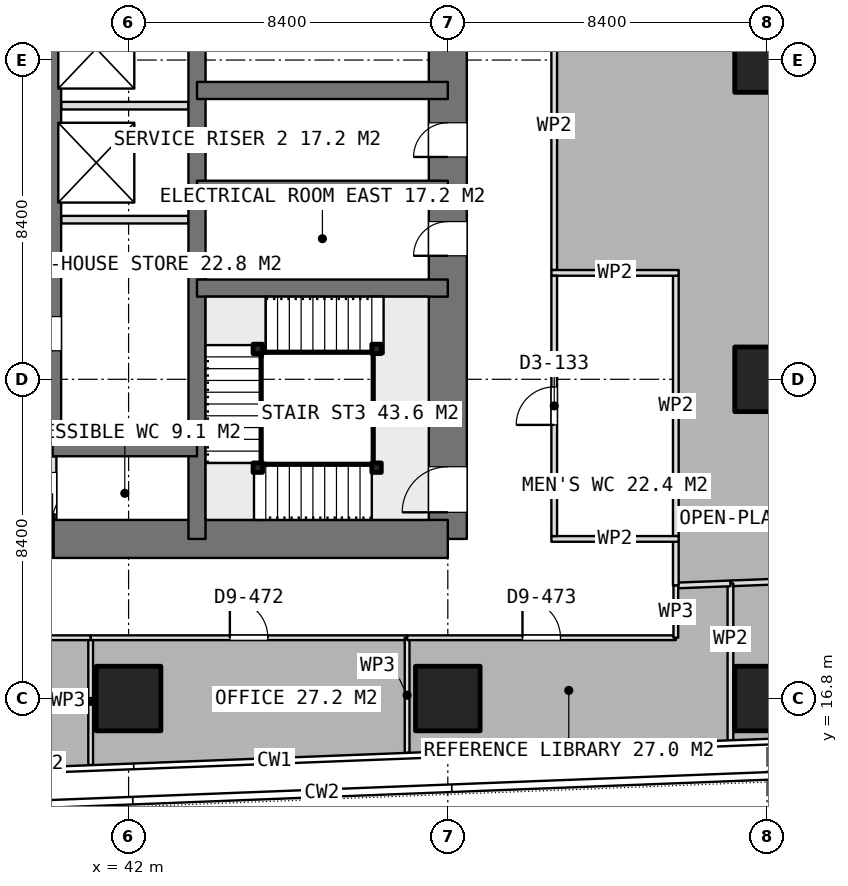
"""IFC4 building model, lengths in metres.
Left out: names, types, materials, properties, quantities, classifications, styles, units other than length and angle.
Written with IfcOpenShell. Run it as: python <this file> out.ifc"""

import sys

from ifc_helpers import new_model, si_unit, direction, frame, frame_2d, origin, origin_2d, place, context, subcontext, project, spatial, rectangle, extrude, element, fill, save


model = new_model("IFC4")
c1 = context("Model", 3, precision=1e-05, world=origin(), true_north=direction((0.0, 1.0)))
c2 = subcontext(c1, "Body", "Model", "MODEL_VIEW")
j1 = project(units=[si_unit("LENGTHUNIT", "METRE"), si_unit("PLANEANGLEUNIT", "RADIAN")], contexts=[c1])
p1 = place(None, origin())
s1 = spatial("IfcSite", under=j1, at=p1, CompositionType="ELEMENT")
p2 = place(p1, origin())
s2 = spatial("IfcBuilding", under=s1, at=p2, CompositionType="ELEMENT")
p3 = place(p2, frame((0.0, 0.0, 125.3)))
s3 = spatial("IfcBuildingStorey", under=s2, at=p3, CompositionType="ELEMENT", Elevation=125.3)
p4 = place(p3, frame((40.0, 21.0, 0.0), z_axis=(0.0, 0.0, 1.0), x_axis=(1.0, 0.0, 0.0)))
e1 = element("IfcWall", 1, at=p4, inside=s3, PredefinedType="SHEAR", context=c2, shape_type="SweptSolid", body=[
    extrude(rectangle(XDim=10.4, YDim=1.0, at=frame_2d((5.2, 0.0))), origin(), (0.0, 0.0, 1.0), 3.75),
])
p5 = place(p3, frame((50.4, 21.0, 0.0), z_axis=(0.0, 0.0, 1.0), x_axis=(0.0, 1.0, 0.0)))
e2 = element("IfcWall", 2, at=p5, inside=s3, PredefinedType="SHEAR", context=c2, shape_type="SweptSolid", body=[
    extrude(rectangle(XDim=25.2, YDim=1.0, at=frame_2d((12.6, 0.0))), origin(), (0.0, 0.0, 1.0), 3.75),
])
p6 = place(p5, frame((16.2, 0.0, 0.0)))
e3 = element("IfcOpeningElement", 3, at=p6, cuts=e2, PredefinedType="OPENING", context=c2, shape_type="SweptSolid", body=[
    extrude(rectangle(XDim=1.2, YDim=2.1, at=frame_2d((0.6, 1.05))), frame((0.0, 0.51, 0.0), z_axis=(0.0, -1.0, 0.0), x_axis=(1.0, 0.0, 0.0)), (0.0, 0.0, 1.0), 1.02),
])
p7 = place(p5, frame((10.05, 0.0, 0.0)))
e4 = element("IfcOpeningElement", 4, at=p7, cuts=e2, PredefinedType="OPENING", context=c2, shape_type="SweptSolid", body=[
    extrude(rectangle(XDim=0.9, YDim=2.1, at=frame_2d((0.45, 1.05))), frame((0.0, 0.51, 0.0), z_axis=(0.0, -1.0, 0.0), x_axis=(1.0, 0.0, 0.0)), (0.0, 0.0, 1.0), 1.02),
])
p8 = place(p5, frame((7.45, 0.0, 0.0)))
e5 = element("IfcOpeningElement", 5, at=p8, cuts=e2, PredefinedType="OPENING", context=c2, shape_type="SweptSolid", body=[
    extrude(rectangle(XDim=0.9, YDim=2.1, at=frame_2d((0.45, 1.05))), frame((0.0, 0.51, 0.0), z_axis=(0.0, -1.0, 0.0), x_axis=(1.0, 0.0, 0.0)), (0.0, 0.0, 1.0), 1.02),
])
p9 = place(p5, frame((0.7, 0.0, 0.0)))
e6 = element("IfcOpeningElement", 6, at=p9, cuts=e2, PredefinedType="OPENING", context=c2, shape_type="SweptSolid", body=[
    extrude(rectangle(XDim=1.2, YDim=2.1, at=frame_2d((0.6, 1.05))), frame((0.0, 0.51, 0.0), z_axis=(0.0, -1.0, 0.0), x_axis=(1.0, 0.0, 0.0)), (0.0, 0.0, 1.0), 1.02),
])
p10 = place(p3, frame((43.8, 21.0, 0.0), z_axis=(0.0, 0.0, 1.0), x_axis=(0.0, 1.0, 0.0)))
e7 = element("IfcWall", 7, at=p10, inside=s3, PredefinedType="SHEAR", context=c2, shape_type="SweptSolid", body=[
    extrude(rectangle(XDim=25.2, YDim=0.45, at=frame_2d((12.6, 0.0))), origin(), (0.0, 0.0, 1.0), 3.75),
])
p11 = place(p3, frame((40.0, 23.4, 0.0), z_axis=(0.0, 0.0, 1.0), x_axis=(0.0, 1.0, 0.0)))
e8 = element("IfcWall", 8, at=p11, inside=s3, PredefinedType="SHEAR", context=c2, shape_type="SweptSolid", body=[
    extrude(rectangle(XDim=18.0, YDim=0.45, at=frame_2d((9.0, 0.0))), origin(), (0.0, 0.0, 1.0), 3.75),
])
p12 = place(p11, frame((2.55, 0.0, 0.0)))
e9 = element("IfcOpeningElement", 9, at=p12, cuts=e8, PredefinedType="OPENING", context=c2, shape_type="SweptSolid", body=[
    extrude(rectangle(XDim=0.9, YDim=2.1, at=frame_2d((0.45, 1.05))), frame((0.0, 0.235, 0.0), z_axis=(0.0, -1.0, 0.0), x_axis=(1.0, 0.0, 0.0)), (0.0, 0.0, 1.0), 0.47),
])
p13 = place(p3, frame((40.0, 23.4, 0.0), z_axis=(0.0, 0.0, 1.0), x_axis=(1.0, 0.0, 0.0)))
e10 = element("IfcWall", 10, at=p13, inside=s3, PredefinedType="SHEAR", context=c2, shape_type="SweptSolid", body=[
    extrude(rectangle(XDim=3.8, YDim=0.45, at=frame_2d((1.9, 0.0))), origin(), (0.0, 0.0, 1.0), 3.75),
])
for number, where, z_axis, x_axis in (
    (11, (43.8, 27.6, 0.0), (0.0, 0.0, 1.0), (1.0, 0.0, 0.0)),
    (12, (43.8, 30.2, 0.0), (0.0, 0.0, 1.0), (1.0, 0.0, 0.0)),
    (13, (43.8, 32.8, 0.0), (0.0, 0.0, 1.0), (1.0, 0.0, 0.0)),
):
    element("IfcWall", number, at=place(p3, frame(where, z_axis=z_axis, x_axis=x_axis)), inside=s3, PredefinedType="SHEAR", context=c2, shape_type="SweptSolid", body=[
        extrude(rectangle(XDim=6.6, YDim=0.45, at=frame_2d((3.3, 0.0))), origin(), (0.0, 0.0, 1.0), 3.75),
    ])
for number, where, z_axis, x_axis in (
    (14, (42.0, 16.8, 0.0), (0.0, 0.0, 1.0), (1.0, 0.0, 0.0)),
    (15, (50.4, 16.8, 0.0), (0.0, 0.0, 1.0), (1.0, 0.0, 0.0)),
    (16, (58.8, 16.8, 0.0), (0.0, 0.0, 1.0), (1.0, 0.0, 0.0)),
    (17, (58.8, 25.2, 0.0), (0.0, 0.0, 1.0), (1.0, 0.0, 0.0)),
    (18, (58.8, 33.6, 0.0), (0.0, 0.0, 1.0), (1.0, 0.0, 0.0)),
):
    element("IfcColumn", number, at=place(p3, frame(where, z_axis=z_axis, x_axis=x_axis)), inside=s3, PredefinedType="COLUMN", context=c2, shape_type="SweptSolid", body=[
        extrude(rectangle(XDim=1.7, YDim=1.7, at=origin_2d()), origin(), (0.0, 0.0, 1.0), 3.75),
    ])
for number, where, z_axis, x_axis in (
    (19, (40.225, 29.4, 0.0), (0.0, 0.0, 1.0), (1.0, 0.0, 0.0)),
    (20, (40.225, 32.4, 0.0), (0.0, 0.0, 1.0), (1.0, 0.0, 0.0)),
):
    element("IfcWall", number, at=place(p3, frame(where, z_axis=z_axis, x_axis=x_axis)), inside=s3, PredefinedType="PARTITIONING", context=c2, shape_type="SweptSolid", body=[
        extrude(rectangle(XDim=3.35, YDim=0.2, at=frame_2d((1.675, 0.0))), origin(), (0.0, 0.0, 1.0), 3.5),
    ])
p14 = place(p3, frame((40.0, 21.5, 0.0), z_axis=(0.0, 0.0, 1.0), x_axis=(0.0, 1.0, 0.0)))
e21 = element("IfcWall", 21, at=p14, inside=s3, PredefinedType="PARTITIONING", context=c2, shape_type="SweptSolid", body=[
    extrude(rectangle(XDim=1.675, YDim=0.2, at=frame_2d((0.837, 0.0))), origin(), (0.0, 0.0, 1.0), 3.5),
])
p15 = place(p14, frame((0.15, 0.0, 0.0)))
e22 = element("IfcOpeningElement", 22, at=p15, cuts=e21, PredefinedType="OPENING", context=c2, shape_type="SweptSolid", body=[
    extrude(rectangle(XDim=1.1, YDim=2.1, at=frame_2d((0.55, 1.05))), frame((0.0, 0.11, 0.0), z_axis=(0.0, -1.0, 0.0), x_axis=(1.0, 0.0, 0.0)), (0.0, 0.0, 1.0), 0.22),
])
for number, where, z_axis, x_axis in (
    (23, (53.125, 21.0, 0.0), (0.0, 0.0, 1.0), (1.0, 0.0, 0.0)),
    (24, (53.125, 28.0, 0.0), (0.0, 0.0, 1.0), (1.0, 0.0, 0.0)),
):
    element("IfcWall", number, at=place(p3, frame(where, z_axis=z_axis, x_axis=x_axis)), inside=s3, PredefinedType="PARTITIONING", context=c2, shape_type="SweptSolid", body=[
        extrude(rectangle(XDim=3.35, YDim=0.15, at=frame_2d((1.675, 0.0))), origin(), (0.0, 0.0, 1.0), 3.5),
    ])
p16 = place(p3, frame((53.2, 21.075, 0.0), z_axis=(0.0, 0.0, 1.0), x_axis=(0.0, 1.0, 0.0)))
e25 = element("IfcWall", 25, at=p16, inside=s3, PredefinedType="PARTITIONING", context=c2, shape_type="SweptSolid", body=[
    extrude(rectangle(XDim=6.85, YDim=0.15, at=frame_2d((3.425, 0.0))), origin(), (0.0, 0.0, 1.0), 3.5),
])
p17 = place(p16, frame((2.925, 0.0, 0.0)))
e26 = element("IfcOpeningElement", 26, at=p17, cuts=e25, PredefinedType="OPENING", context=c2, shape_type="SweptSolid", body=[
    extrude(rectangle(XDim=1.0, YDim=2.1, at=frame_2d((0.5, 1.05))), frame((0.0, 0.085, 0.0), z_axis=(0.0, -1.0, 0.0), x_axis=(1.0, 0.0, 0.0)), (0.0, 0.0, 1.0), 0.17),
])
p18 = place(p3, frame((56.4, 21.075, 0.0), z_axis=(0.0, 0.0, 1.0), x_axis=(0.0, 1.0, 0.0)))
e27 = element("IfcWall", 27, at=p18, inside=s3, PredefinedType="PARTITIONING", context=c2, shape_type="SweptSolid", body=[
    extrude(rectangle(XDim=6.85, YDim=0.15, at=frame_2d((3.425, 0.0))), origin(), (0.0, 0.0, 1.0), 3.5),
])
p19 = place(p3, frame((53.2, 28.075, 0.0), z_axis=(0.0, 0.0, 1.0), x_axis=(0.0, 1.0, 0.0)))
e28 = element("IfcWall", 28, at=p19, inside=s3, PredefinedType="PARTITIONING", context=c2, shape_type="SweptSolid", body=[
    extrude(rectangle(XDim=7.562, YDim=0.15, at=frame_2d((3.781, 0.0))), origin(), (0.0, 0.0, 1.0), 3.5),
])
p20 = place(p3, frame((64.041, 20.071, 0.0), z_axis=(0.0, 0.0, 1.0), x_axis=(-0.999246582692, -0.038810655482, 0.0)))
e29 = element("IfcWall", 29, at=p20, inside=s3, PredefinedType="PARTITIONING", context=c2, shape_type="SweptSolid", body=[
    extrude(rectangle(XDim=6.209, YDim=0.15, at=frame_2d((3.104, 0.0))), origin(), (0.0, 0.0, 1.0), 3.5),
])
p21 = place(p20, frame((2.604, 0.0, 0.0)))
e30 = element("IfcOpeningElement", 30, at=p21, cuts=e29, PredefinedType="OPENING", context=c2, shape_type="SweptSolid", body=[
    extrude(rectangle(XDim=1.0, YDim=2.1, at=frame_2d((0.5, 1.05))), frame((0.0, 0.085, 0.0), z_axis=(0.0, -1.0, 0.0), x_axis=(1.0, 0.0, 0.0)), (0.0, 0.0, 1.0), 0.17),
])
p22 = place(p3, frame((57.837, 19.83, 0.0), z_axis=(0.0, 0.0, 1.0), x_axis=(0.0, -1.0, 0.0)))
e31 = element("IfcWall", 31, at=p22, inside=s3, PredefinedType="PARTITIONING", context=c2, shape_type="SweptSolid", body=[
    extrude(rectangle(XDim=4.154, YDim=0.15, at=frame_2d((2.077, 0.0))), origin(), (0.0, 0.0, 1.0), 3.5),
])
p23 = place(p3, frame((57.836, 19.83, 0.0), z_axis=(0.0, 0.0, 1.0), x_axis=(-0.99923637883, -0.039072486761, 0.0)))
e32 = element("IfcWall", 32, at=p23, inside=s3, PredefinedType="PARTITIONING", context=c2, shape_type="SweptSolid", body=[
    extrude(rectangle(XDim=1.437, YDim=0.15, at=frame_2d((0.719, 0.0))), origin(), (0.0, 0.0, 1.0), 3.5),
])
p24 = place(p3, frame((56.4, 19.774, 0.0), z_axis=(0.0, 0.0, 1.0), x_axis=(0.0, 1.0, 0.0)))
e33 = element("IfcWall", 33, at=p24, inside=s3, PredefinedType="PARTITIONING", context=c2, shape_type="SweptSolid", body=[
    extrude(rectangle(XDim=1.301, YDim=0.15, at=frame_2d((0.65, 0.0))), origin(), (0.0, 0.0, 1.0), 3.5),
])
p25 = place(p3, frame((41.002, 15.051, 0.0), z_axis=(0.0, 0.0, 1.0), x_axis=(0.0, 1.0, 0.0)))
e34 = element("IfcWall", 34, at=p25, inside=s3, PredefinedType="PARTITIONING", context=c2, shape_type="SweptSolid", body=[
    extrude(rectangle(XDim=3.349, YDim=0.125, at=frame_2d((1.674, 0.0))), origin(), (0.0, 0.0, 1.0), 3.5),
])
p26 = place(p3, frame((41.002, 18.4, 0.0), z_axis=(0.0, 0.0, 1.0), x_axis=(1.0, 0.0, 0.0)))
e35 = element("IfcWall", 35, at=p26, inside=s3, PredefinedType="PARTITIONING", context=c2, shape_type="SweptSolid", body=[
    extrude(rectangle(XDim=8.327, YDim=0.125, at=frame_2d((4.164, 0.0))), origin(), (0.0, 0.0, 1.0), 3.5),
])
p27 = place(p26, frame((3.663, 0.0, 0.0)))
e36 = element("IfcOpeningElement", 36, at=p27, cuts=e35, PredefinedType="OPENING", context=c2, shape_type="SweptSolid", body=[
    extrude(rectangle(XDim=1.0, YDim=2.1, at=frame_2d((0.5, 1.05))), frame((0.0, 0.073, 0.0), z_axis=(0.0, -1.0, 0.0), x_axis=(1.0, 0.0, 0.0)), (0.0, 0.0, 1.0), 0.145),
])
p28 = place(p3, frame((49.329, 18.4, 0.0), z_axis=(0.0, 0.0, 1.0), x_axis=(0.0, -1.0, 0.0)))
e37 = element("IfcWall", 37, at=p28, inside=s3, PredefinedType="PARTITIONING", context=c2, shape_type="SweptSolid", body=[
    extrude(rectangle(XDim=3.025, YDim=0.125, at=frame_2d((1.512, 0.0))), origin(), (0.0, 0.0, 1.0), 3.5),
])
p29 = place(p3, frame((49.33, 18.4, 0.0), z_axis=(0.0, 0.0, 1.0), x_axis=(1.0, 0.0, 0.0)))
e38 = element("IfcWall", 38, at=p29, inside=s3, PredefinedType="PARTITIONING", context=c2, shape_type="SweptSolid", body=[
    extrude(rectangle(XDim=7.07, YDim=0.125, at=frame_2d((3.535, 0.0))), origin(), (0.0, 0.0, 1.0), 3.5),
])
p30 = place(p29, frame((3.035, 0.0, 0.0)))
e39 = element("IfcOpeningElement", 39, at=p30, cuts=e38, PredefinedType="OPENING", context=c2, shape_type="SweptSolid", body=[
    extrude(rectangle(XDim=1.0, YDim=2.1, at=frame_2d((0.5, 1.05))), frame((0.0, 0.073, 0.0), z_axis=(0.0, -1.0, 0.0), x_axis=(1.0, 0.0, 0.0)), (0.0, 0.0, 1.0), 0.145),
])
p31 = place(p3, frame((56.4, 18.4, 0.0), z_axis=(0.0, 0.0, 1.0), x_axis=(0.0, 1.0, 0.0)))
e40 = element("IfcWall", 40, at=p31, inside=s3, PredefinedType="PARTITIONING", context=c2, shape_type="SweptSolid", body=[
    extrude(rectangle(XDim=1.374, YDim=0.125, at=frame_2d((0.687, 0.0))), origin(), (0.0, 0.0, 1.0), 3.5),
])
p32 = place(p3, frame((32.495, 18.4, 0.0), z_axis=(0.0, 0.0, 1.0), x_axis=(1.0, 0.0, 0.0)))
e41 = element("IfcWall", 41, at=p32, inside=s3, PredefinedType="PARTITIONING", context=c2, shape_type="SweptSolid", body=[
    extrude(rectangle(XDim=8.506, YDim=0.125, at=frame_2d((4.253, 0.0))), origin(), (0.0, 0.0, 1.0), 3.5),
])
p33 = place(p32, frame((3.753, 0.0, 0.0)))
e42 = element("IfcOpeningElement", 42, at=p33, cuts=e41, PredefinedType="OPENING", context=c2, shape_type="SweptSolid", body=[
    extrude(rectangle(XDim=1.0, YDim=2.1, at=frame_2d((0.5, 1.05))), frame((0.0, 0.073, 0.0), z_axis=(0.0, -1.0, 0.0), x_axis=(1.0, 0.0, 0.0)), (0.0, 0.0, 1.0), 0.145),
])
for number, where, z_axis, x_axis in (
    (43, (48.525, 22.875, 0.0), (0.0, 0.0, 1.0), (1.0, 0.0, 0.0)),
    (44, (45.4, 22.875, 0.0), (0.0, 0.0, 1.0), (1.0, 0.0, 0.0)),
    (45, (45.4, 26.0, 0.0), (0.0, 0.0, 1.0), (1.0, 0.0, 0.0)),
    (46, (48.525, 26.0, 0.0), (0.0, 0.0, 1.0), (1.0, 0.0, 0.0)),
):
    element("IfcColumn", number, at=place(p3, frame(where, z_axis=z_axis, x_axis=x_axis)), inside=s3, PredefinedType="COLUMN", context=c2, shape_type="SweptSolid", body=[
        extrude(rectangle(XDim=0.25, YDim=0.25, at=origin_2d()), origin(), (0.0, 0.0, 1.0), 3.75),
    ])
p34 = place(p7, origin())
e47 = element("IfcDoor", 47, at=p34, inside=s3, OperationType="SINGLE_SWING_LEFT", PredefinedType="DOOR", context=c2, shape_type="SweptSolid", body=[
    extrude(rectangle(XDim=0.9, YDim=2.1, at=frame_2d((0.45, 1.05))), frame((0.0, 0.025, 0.0), z_axis=(0.0, -1.0, 0.0), x_axis=(1.0, 0.0, 0.0)), (0.0, 0.0, 1.0), 0.05),
])
fill(e4, e47)
p35 = place(p8, origin())
e48 = element("IfcDoor", 48, at=p35, inside=s3, OperationType="SINGLE_SWING_LEFT", PredefinedType="DOOR", context=c2, shape_type="SweptSolid", body=[
    extrude(rectangle(XDim=0.9, YDim=2.1, at=frame_2d((0.45, 1.05))), frame((0.0, 0.025, 0.0), z_axis=(0.0, -1.0, 0.0), x_axis=(1.0, 0.0, 0.0)), (0.0, 0.0, 1.0), 0.05),
])
fill(e5, e48)
p36 = place(p15, origin())
e49 = element("IfcDoor", 49, at=p36, inside=s3, OperationType="SLIDING_TO_LEFT", PredefinedType="DOOR", context=c2, shape_type="SweptSolid", body=[
    extrude(rectangle(XDim=1.1, YDim=2.1, at=frame_2d((0.55, 1.05))), frame((0.0, 0.025, 0.0), z_axis=(0.0, -1.0, 0.0), x_axis=(1.0, 0.0, 0.0)), (0.0, 0.0, 1.0), 0.05),
])
fill(e22, e49)
p37 = place(p12, origin())
e50 = element("IfcDoor", 50, at=p37, inside=s3, OperationType="SINGLE_SWING_LEFT", PredefinedType="DOOR", context=c2, shape_type="SweptSolid", body=[
    extrude(rectangle(XDim=0.9, YDim=2.1, at=frame_2d((0.45, 1.05))), frame((0.0, 0.025, 0.0), z_axis=(0.0, -1.0, 0.0), x_axis=(1.0, 0.0, 0.0)), (0.0, 0.0, 1.0), 0.05),
])
fill(e9, e50)
p38 = place(p17, origin())
e51 = element("IfcDoor", 51, at=p38, inside=s3, OperationType="SINGLE_SWING_LEFT", PredefinedType="DOOR", context=c2, shape_type="SweptSolid", body=[
    extrude(rectangle(XDim=1.0, YDim=2.1, at=frame_2d((0.5, 1.05))), frame((0.0, 0.025, 0.0), z_axis=(0.0, -1.0, 0.0), x_axis=(1.0, 0.0, 0.0)), (0.0, 0.0, 1.0), 0.05),
])
fill(e26, e51)
p39 = place(p27, origin())
e52 = element("IfcDoor", 52, at=p39, inside=s3, OperationType="SINGLE_SWING_LEFT", PredefinedType="DOOR", context=c2, shape_type="SweptSolid", body=[
    extrude(rectangle(XDim=1.0, YDim=2.1, at=frame_2d((0.5, 1.05))), frame((0.0, 0.025, 0.0), z_axis=(0.0, -1.0, 0.0), x_axis=(1.0, 0.0, 0.0)), (0.0, 0.0, 1.0), 0.05),
])
fill(e36, e52)
p40 = place(p30, origin())
e53 = element("IfcDoor", 53, at=p40, inside=s3, OperationType="SINGLE_SWING_LEFT", PredefinedType="DOOR", context=c2, shape_type="SweptSolid", body=[
    extrude(rectangle(XDim=1.0, YDim=2.1, at=frame_2d((0.5, 1.05))), frame((0.0, 0.025, 0.0), z_axis=(0.0, -1.0, 0.0), x_axis=(1.0, 0.0, 0.0)), (0.0, 0.0, 1.0), 0.05),
])
fill(e39, e53)
p41 = place(p9, origin())
e54 = element("IfcDoor", 54, at=p41, inside=s3, OperationType="SINGLE_SWING_RIGHT", PredefinedType="DOOR", context=c2, shape_type="SweptSolid", body=[
    extrude(rectangle(XDim=1.2, YDim=2.1, at=frame_2d((0.6, 1.05))), frame((0.0, 0.025, 0.0), z_axis=(0.0, -1.0, 0.0), x_axis=(1.0, 0.0, 0.0)), (0.0, 0.0, 1.0), 0.05),
])
fill(e6, e54)
save(model, sys.argv[1])
